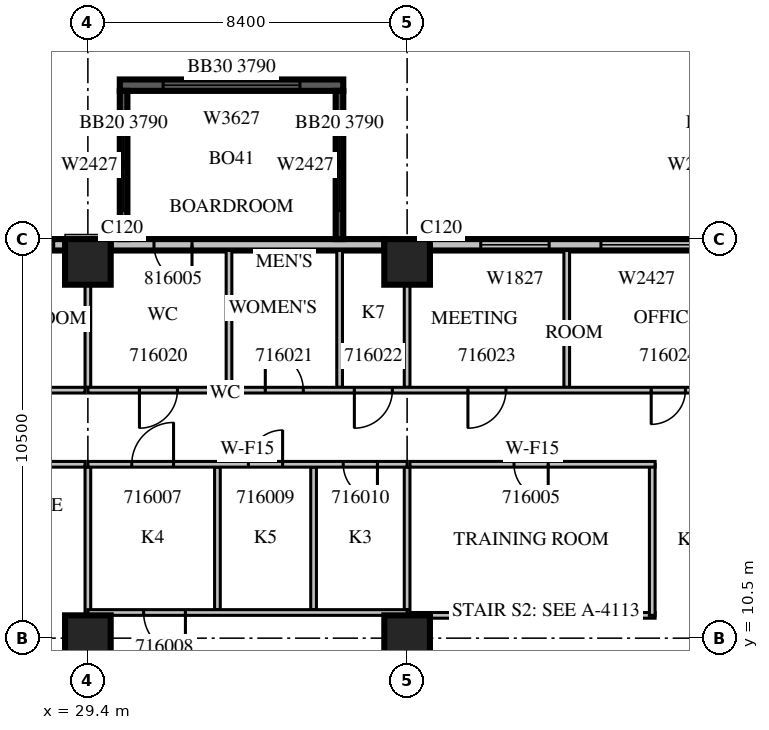
"""IFC4 building model, lengths in metres.
Left out: names, types, materials, properties, quantities, classifications, styles, units other than length and angle.
Written with IfcOpenShell. Run it as: python <this file> out.ifc"""

import sys

from ifc_helpers import new_model, si_unit, direction, frame, frame_2d, origin, origin_2d, place, context, subcontext, project, spatial, rectangle, extrude, source, transform, mapped, element, fill, save


model = new_model("IFC4")
c1 = context("Model", 3, precision=1e-05, world=origin(), true_north=direction((0.0, 1.0)))
c2 = subcontext(c1, "Body", "Model", "MODEL_VIEW")
j1 = project(units=[si_unit("LENGTHUNIT", "METRE"), si_unit("PLANEANGLEUNIT", "RADIAN")], contexts=[c1])
p1 = place(None, origin())
s1 = spatial("IfcSite", under=j1, at=p1, CompositionType="ELEMENT")
p2 = place(p1, origin())
s2 = spatial("IfcBuilding", under=s1, at=p2, CompositionType="ELEMENT")
p3 = place(p2, frame((0.0, 0.0, 78.3)))
s3 = spatial("IfcBuildingStorey", under=s2, at=p3, CompositionType="ELEMENT", Elevation=78.3)
m1 = source(origin(), c2, "Body", "SweptSolid", [
    extrude(rectangle(XDim=1.2, YDim=1.2, at=origin_2d()), origin(), (0.0, 0.0, 1.0), 4.2),
])
for number, where, z_axis, x_axis in (
    (1, (29.4, 10.5, 0.0), (0.0, 0.0, 1.0), (1.0, 0.0, 0.0)),
    (2, (37.8, 10.5, 0.0), (0.0, 0.0, 1.0), (1.0, 0.0, 0.0)),
    (3, (29.4, 20.4, 0.0), (0.0, 0.0, 1.0), (1.0, 0.0, 0.0)),
    (4, (37.8, 20.4, 0.0), (0.0, 0.0, 1.0), (1.0, 0.0, 0.0)),
):
    element("IfcColumn", number, at=place(p3, frame(where, z_axis=z_axis, x_axis=x_axis)), inside=s3, PredefinedType="COLUMN", context=c2, shape_type="MappedRepresentation", body=[
        mapped(m1, transform((0.0, 0.0, 0.0), scale=1.0)),
    ])
m2 = source(origin(), c2, "Body", "SweptSolid", [
    extrude(rectangle(XDim=7.2, YDim=0.3, at=frame_2d((3.6, 0.0))), origin(), (0.0, 0.0, 1.0), 3.8),
])
p4 = place(p3, frame((45.6, 20.85, 0.0), z_axis=(0.0, 0.0, 1.0), x_axis=(-1.0, 0.0, 0.0)))
e5 = element("IfcWall", 5, at=p4, inside=s3, PredefinedType="STANDARD", context=c2, shape_type="MappedRepresentation", body=[
    mapped(m2, transform((0.0, 0.0, 0.0), scale=1.0)),
])
m3 = source(origin(), c2, "Body", "SweptSolid", [
    extrude(rectangle(XDim=2.4, YDim=2.7, at=frame_2d((1.2, 1.35))), frame((0.0, 0.16, 0.0), z_axis=(0.0, -1.0, 0.0), x_axis=(1.0, 0.0, 0.0)), (0.0, 0.0, 1.0), 0.32),
])
p5 = place(p4, frame((0.3, 0.0, 0.6)))
e6 = element("IfcOpeningElement", 6, at=p5, cuts=e5, PredefinedType="OPENING", context=c2, shape_type="MappedRepresentation", body=[
    mapped(m3, transform((0.0, 0.0, 0.0), scale=1.0)),
])
m4 = source(origin(), c2, "Body", "SweptSolid", [
    extrude(rectangle(XDim=1.8, YDim=2.7, at=frame_2d((0.9, 1.35))), frame((0.0, 0.16, 0.0), z_axis=(0.0, -1.0, 0.0), x_axis=(1.0, 0.0, 0.0)), (0.0, 0.0, 1.0), 0.32),
])
p6 = place(p4, frame((4.062, 0.0, 0.6)))
e7 = element("IfcOpeningElement", 7, at=p6, cuts=e5, PredefinedType="OPENING", context=c2, shape_type="MappedRepresentation", body=[
    mapped(m4, transform((0.0, 0.0, 0.0), scale=1.0)),
])
p7 = place(p3, frame((37.2, 20.85, 0.0), z_axis=(0.0, 0.0, 1.0), x_axis=(-1.0, 0.0, 0.0)))
e8 = element("IfcWall", 8, at=p7, inside=s3, PredefinedType="STANDARD", context=c2, shape_type="MappedRepresentation", body=[
    mapped(m2, transform((0.0, 0.0, 0.0), scale=1.0)),
])
m5 = source(origin(), c2, "Body", "SweptSolid", [
    extrude(rectangle(XDim=1.0, YDim=2.1, at=frame_2d((0.5, 1.05))), frame((0.0, 0.16, 0.0), z_axis=(0.0, -1.0, 0.0), x_axis=(1.0, 0.0, 0.0)), (0.0, 0.0, 1.0), 0.32),
])
p8 = place(p7, frame((5.06, 0.0, 0.0)))
e9 = element("IfcOpeningElement", 9, at=p8, cuts=e8, PredefinedType="OPENING", context=c2, shape_type="MappedRepresentation", body=[
    mapped(m5, transform((0.0, 0.0, 0.0), scale=1.0)),
])
m6 = source(origin(), c2, "Body", "SweptSolid", [
    extrude(rectangle(XDim=6.6, YDim=0.3, at=frame_2d((3.3, 0.0))), origin(), (0.0, 0.0, 1.0), 3.8),
])
p9 = place(p3, frame((28.8, 20.85, 0.0), z_axis=(0.0, 0.0, 1.0), x_axis=(-1.0, 0.0, 0.0)))
e10 = element("IfcWall", 10, at=p9, inside=s3, PredefinedType="STANDARD", context=c2, shape_type="MappedRepresentation", body=[
    mapped(m6, transform((0.0, 0.0, 0.0), scale=1.0)),
])
p10 = place(p9, frame((0.3, 0.0, 0.6)))
e11 = element("IfcOpeningElement", 11, at=p10, cuts=e10, PredefinedType="OPENING", context=c2, shape_type="MappedRepresentation", body=[
    mapped(m3, transform((0.0, 0.0, 0.0), scale=1.0)),
])
m7 = source(origin(), c2, "Body", "SweptSolid", [
    extrude(rectangle(XDim=1.2, YDim=2.7, at=frame_2d((0.6, 1.35))), frame((0.0, 0.16, 0.0), z_axis=(0.0, -1.0, 0.0), x_axis=(1.0, 0.0, 0.0)), (0.0, 0.0, 1.0), 0.32),
])
p11 = place(p9, frame((4.412, 0.0, 0.6)))
e12 = element("IfcOpeningElement", 12, at=p11, cuts=e10, PredefinedType="OPENING", context=c2, shape_type="MappedRepresentation", body=[
    mapped(m7, transform((0.0, 0.0, 0.0), scale=1.0)),
])
m8 = source(origin(), c2, "Body", "SweptSolid", [
    extrude(rectangle(XDim=5.88, YDim=0.3, at=frame_2d((2.94, 0.0))), origin(), (0.0, 0.0, 1.0), 3.79),
])
p12 = place(p3, frame((36.12, 25.05, 0.0), z_axis=(0.0, 0.0, 1.0), x_axis=(-1.0, 0.0, 0.0)))
e13 = element("IfcWall", 13, at=p12, inside=s3, PredefinedType="SOLIDWALL", context=c2, shape_type="MappedRepresentation", body=[
    mapped(m8, transform((0.0, 0.0, 0.0), scale=1.0)),
])
m9 = source(origin(), c2, "Body", "SweptSolid", [
    extrude(rectangle(XDim=3.6, YDim=2.7, at=frame_2d((1.8, 1.35))), frame((0.0, 0.16, 0.0), z_axis=(0.0, -1.0, 0.0), x_axis=(1.0, 0.0, 0.0)), (0.0, 0.0, 1.0), 0.32),
])
p13 = place(p12, frame((1.14, 0.0, 0.6)))
e14 = element("IfcOpeningElement", 14, at=p13, cuts=e13, PredefinedType="OPENING", context=c2, shape_type="MappedRepresentation", body=[
    mapped(m9, transform((0.0, 0.0, 0.0), scale=1.0)),
])
m10 = source(origin(), c2, "Body", "SweptSolid", [
    extrude(rectangle(XDim=3.9, YDim=0.2, at=frame_2d((1.95, 0.0))), origin(), (0.0, 0.0, 1.0), 3.79),
])
p14 = place(p3, frame((36.02, 21.0, 0.0), z_axis=(0.0, 0.0, 1.0), x_axis=(0.0, 1.0, 0.0)))
e15 = element("IfcWall", 15, at=p14, inside=s3, PredefinedType="SOLIDWALL", context=c2, shape_type="MappedRepresentation", body=[
    mapped(m10, transform((0.0, 0.0, 0.0), scale=1.0)),
])
m11 = source(origin(), c2, "Body", "SweptSolid", [
    extrude(rectangle(XDim=2.4, YDim=2.7, at=frame_2d((1.2, 1.35))), frame((0.0, 0.11, 0.0), z_axis=(0.0, -1.0, 0.0), x_axis=(1.0, 0.0, 0.0)), (0.0, 0.0, 1.0), 0.22),
])
p15 = place(p14, frame((0.75, 0.0, 0.6)))
e16 = element("IfcOpeningElement", 16, at=p15, cuts=e15, PredefinedType="OPENING", context=c2, shape_type="MappedRepresentation", body=[
    mapped(m11, transform((0.0, 0.0, 0.0), scale=1.0)),
])
p16 = place(p3, frame((30.34, 21.0, 0.0), z_axis=(0.0, 0.0, 1.0), x_axis=(0.0, 1.0, 0.0)))
e17 = element("IfcWall", 17, at=p16, inside=s3, PredefinedType="SOLIDWALL", context=c2, shape_type="MappedRepresentation", body=[
    mapped(m10, transform((0.0, 0.0, 0.0), scale=1.0)),
])
p17 = place(p16, frame((0.75, 0.0, 0.6)))
e18 = element("IfcOpeningElement", 18, at=p17, cuts=e17, PredefinedType="OPENING", context=c2, shape_type="MappedRepresentation", body=[
    mapped(m11, transform((0.0, 0.0, 0.0), scale=1.0)),
])
m12 = source(origin(), c2, "Body", "SweptSolid", [
    extrude(rectangle(XDim=4.45, YDim=0.15, at=frame_2d((2.225, 0.0))), origin(), (0.0, 0.0, 1.0), 3.8),
])
for number, where, z_axis, x_axis in (
    (19, (29.325, 15.075, 0.0), (0.0, 0.0, 1.0), (-1.0, 0.0, 0.0)),
    (20, (24.875, 17.025, 0.0), (0.0, 0.0, 1.0), (1.0, 0.0, 0.0)),
):
    element("IfcWall", number, at=place(p3, frame(where, z_axis=z_axis, x_axis=x_axis)), inside=s3, PredefinedType="PARTITIONING", context=c2, shape_type="MappedRepresentation", body=[
        mapped(m12, transform((0.0, 0.0, 0.0), scale=1.0)),
    ])
m13 = source(origin(), c2, "Body", "SweptSolid", [
    extrude(rectangle(XDim=3.901, YDim=0.15, at=frame_2d((1.95, 0.0))), origin(), (0.0, 0.0, 1.0), 3.8),
])
p18 = place(p3, frame((29.4, 11.099, 0.0), z_axis=(0.0, 0.0, 1.0), x_axis=(0.0, 1.0, 0.0)))
e21 = element("IfcWall", 21, at=p18, inside=s3, PredefinedType="PARTITIONING", context=c2, shape_type="MappedRepresentation", body=[
    mapped(m13, transform((0.0, 0.0, 0.0), scale=1.0)),
])
m14 = source(origin(), c2, "Body", "SweptSolid", [
    extrude(rectangle(XDim=2.701, YDim=0.15, at=frame_2d((1.351, 0.0))), origin(), (0.0, 0.0, 1.0), 3.8),
])
p19 = place(p3, frame((29.4, 17.1, 0.0), z_axis=(0.0, 0.0, 1.0), x_axis=(0.0, 1.0, 0.0)))
e22 = element("IfcWall", 22, at=p19, inside=s3, PredefinedType="PARTITIONING", context=c2, shape_type="MappedRepresentation", body=[
    mapped(m14, transform((0.0, 0.0, 0.0), scale=1.0)),
])
m15 = source(origin(), c2, "Body", "SweptSolid", [
    extrude(rectangle(XDim=6.45, YDim=0.15, at=frame_2d((3.225, 0.0))), origin(), (0.0, 0.0, 1.0), 3.8),
])
p20 = place(p3, frame((37.875, 11.1, 0.0), z_axis=(0.0, 0.0, 1.0), x_axis=(1.0, 0.0, 0.0)))
e23 = element("IfcWall", 23, at=p20, inside=s3, PredefinedType="PARTITIONING", context=c2, shape_type="MappedRepresentation", body=[
    mapped(m15, transform((0.0, 0.0, 0.0), scale=1.0)),
])
m16 = source(origin(), c2, "Body", "SweptSolid", [
    extrude(rectangle(XDim=3.975, YDim=0.15, at=frame_2d((1.988, 0.0))), origin(), (0.0, 0.0, 1.0), 3.8),
])
p21 = place(p3, frame((44.25, 11.1, 0.0), z_axis=(0.0, 0.0, 1.0), x_axis=(0.0, 1.0, 0.0)))
e24 = element("IfcWall", 24, at=p21, inside=s3, PredefinedType="PARTITIONING", context=c2, shape_type="MappedRepresentation", body=[
    mapped(m16, transform((0.0, 0.0, 0.0), scale=1.0)),
])
p22 = place(p3, frame((44.325, 15.075, 0.0), z_axis=(0.0, 0.0, 1.0), x_axis=(-1.0, 0.0, 0.0)))
e25 = element("IfcWall", 25, at=p22, inside=s3, PredefinedType="PARTITIONING", context=c2, shape_type="MappedRepresentation", body=[
    mapped(m15, transform((0.0, 0.0, 0.0), scale=1.0)),
])
m17 = source(origin(), c2, "Body", "SweptSolid", [
    extrude(rectangle(XDim=0.9, YDim=2.1, at=frame_2d((0.45, 1.05))), frame((0.0, 0.085, 0.0), z_axis=(0.0, -1.0, 0.0), x_axis=(1.0, 0.0, 0.0)), (0.0, 0.0, 1.0), 0.17),
])
p23 = place(p22, frame((2.812, 0.0, 0.0)))
e26 = element("IfcOpeningElement", 26, at=p23, cuts=e25, PredefinedType="OPENING", context=c2, shape_type="MappedRepresentation", body=[
    mapped(m17, transform((0.0, 0.0, 0.0), scale=1.0)),
])
m18 = source(origin(), c2, "Body", "SweptSolid", [
    extrude(rectangle(XDim=3.75, YDim=0.15, at=frame_2d((1.875, 0.0))), origin(), (0.0, 0.0, 1.0), 3.8),
])
for number, where, z_axis, x_axis in (
    (27, (32.809, 11.25, 0.0), (0.0, 0.0, 1.0), (0.0, 1.0, 0.0)),
    (28, (35.339, 11.25, 0.0), (0.0, 0.0, 1.0), (0.0, 1.0, 0.0)),
    (29, (37.8, 11.25, 0.0), (0.0, 0.0, 1.0), (0.0, 1.0, 0.0)),
):
    element("IfcWall", number, at=place(p3, frame(where, z_axis=z_axis, x_axis=x_axis)), inside=s3, PredefinedType="PARTITIONING", context=c2, shape_type="MappedRepresentation", body=[
        mapped(m18, transform((0.0, 0.0, 0.0), scale=1.0)),
    ])
m19 = source(origin(), c2, "Body", "SweptSolid", [
    extrude(rectangle(XDim=8.4, YDim=0.15, at=frame_2d((4.2, 0.0))), origin(), (0.0, 0.0, 1.0), 3.8),
])
p24 = place(p3, frame((37.8, 11.175, 0.0), z_axis=(0.0, 0.0, 1.0), x_axis=(-1.0, 0.0, 0.0)))
e30 = element("IfcWall", 30, at=p24, inside=s3, PredefinedType="PARTITIONING", context=c2, shape_type="MappedRepresentation", body=[
    mapped(m19, transform((0.0, 0.0, 0.0), scale=1.0)),
])
m20 = source(origin(), c2, "Body", "SweptSolid", [
    extrude(rectangle(XDim=1.1, YDim=2.1, at=frame_2d((0.55, 1.05))), frame((0.0, 0.085, 0.0), z_axis=(0.0, -1.0, 0.0), x_axis=(1.0, 0.0, 0.0)), (0.0, 0.0, 1.0), 0.17),
])
p25 = place(p24, frame((5.833, 0.0, 0.0)))
e31 = element("IfcOpeningElement", 31, at=p25, cuts=e30, PredefinedType="OPENING", context=c2, shape_type="MappedRepresentation", body=[
    mapped(m20, transform((0.0, 0.0, 0.0), scale=1.0)),
])
m21 = source(origin(), c2, "Body", "SweptSolid", [
    extrude(rectangle(XDim=3.6, YDim=0.15, at=frame_2d((1.8, 0.0))), origin(), (0.0, 0.0, 1.0), 3.8),
])
for number, where, z_axis, x_axis in (
    (32, (33.113, 20.7, 0.0), (0.0, 0.0, 1.0), (0.0, -1.0, 0.0)),
    (33, (36.024, 20.7, 0.0), (0.0, 0.0, 1.0), (0.0, -1.0, 0.0)),
):
    element("IfcWall", number, at=place(p3, frame(where, z_axis=z_axis, x_axis=x_axis)), inside=s3, PredefinedType="PARTITIONING", context=c2, shape_type="MappedRepresentation", body=[
        mapped(m21, transform((0.0, 0.0, 0.0), scale=1.0)),
    ])
p26 = place(p3, frame((37.8, 17.1, 0.0), z_axis=(0.0, 0.0, 1.0), x_axis=(0.0, 1.0, 0.0)))
e34 = element("IfcWall", 34, at=p26, inside=s3, PredefinedType="PARTITIONING", context=c2, shape_type="MappedRepresentation", body=[
    mapped(m14, transform((0.0, 0.0, 0.0), scale=1.0)),
])
p27 = place(p3, frame((42.0, 17.1, 0.0), z_axis=(0.0, 0.0, 1.0), x_axis=(0.0, 1.0, 0.0)))
e35 = element("IfcWall", 35, at=p27, inside=s3, PredefinedType="PARTITIONING", context=c2, shape_type="MappedRepresentation", body=[
    mapped(m21, transform((0.0, 0.0, 0.0), scale=1.0)),
])
p28 = place(p3, frame((37.8, 15.075, 0.0), z_axis=(0.0, 0.0, 1.0), x_axis=(-1.0, 0.0, 0.0)))
e36 = element("IfcWall", 36, at=p28, inside=s3, PredefinedType="PARTITIONING", context=c2, shape_type="MappedRepresentation", body=[
    mapped(m19, transform((0.0, 0.0, 0.0), scale=1.0)),
])
p29 = place(p28, frame((6.146, 0.0, 0.0)))
e37 = element("IfcOpeningElement", 37, at=p29, cuts=e36, PredefinedType="OPENING", context=c2, shape_type="MappedRepresentation", body=[
    mapped(m20, transform((0.0, 0.0, 0.0), scale=1.0)),
])
p30 = place(p28, frame((3.276, 0.0, 0.0)))
e38 = element("IfcOpeningElement", 38, at=p30, cuts=e36, PredefinedType="OPENING", context=c2, shape_type="MappedRepresentation", body=[
    mapped(m17, transform((0.0, 0.0, 0.0), scale=1.0)),
])
p31 = place(p28, frame((0.781, 0.0, 0.0)))
e39 = element("IfcOpeningElement", 39, at=p31, cuts=e36, PredefinedType="OPENING", context=c2, shape_type="MappedRepresentation", body=[
    mapped(m17, transform((0.0, 0.0, 0.0), scale=1.0)),
])
m22 = source(origin(), c2, "Body", "SweptSolid", [
    extrude(rectangle(XDim=37.5, YDim=0.15, at=frame_2d((18.75, 0.0))), origin(), (0.0, 0.0, 1.0), 3.8),
])
p32 = place(p3, frame((29.4, 17.025, 0.0), z_axis=(0.0, 0.0, 1.0), x_axis=(1.0, 0.0, 0.0)))
e40 = element("IfcWall", 40, at=p32, inside=s3, PredefinedType="PARTITIONING", context=c2, shape_type="MappedRepresentation", body=[
    mapped(m22, transform((0.0, 0.0, 0.0), scale=1.0)),
])
m23 = source(origin(), c2, "Body", "SweptSolid", [
    extrude(rectangle(XDim=1.0, YDim=2.1, at=frame_2d((0.5, 1.05))), frame((0.0, 0.085, 0.0), z_axis=(0.0, -1.0, 0.0), x_axis=(1.0, 0.0, 0.0)), (0.0, 0.0, 1.0), 0.17),
])
p33 = place(p32, frame((1.357, 0.0, 0.0)))
e41 = element("IfcOpeningElement", 41, at=p33, cuts=e40, PredefinedType="OPENING", context=c2, shape_type="MappedRepresentation", body=[
    mapped(m23, transform((0.0, 0.0, 0.0), scale=1.0)),
])
p34 = place(p32, frame((4.669, 0.0, 0.0)))
e42 = element("IfcOpeningElement", 42, at=p34, cuts=e40, PredefinedType="OPENING", context=c2, shape_type="MappedRepresentation", body=[
    mapped(m23, transform((0.0, 0.0, 0.0), scale=1.0)),
])
p35 = place(p32, frame((7.012, 0.0, 0.0)))
e43 = element("IfcOpeningElement", 43, at=p35, cuts=e40, PredefinedType="OPENING", context=c2, shape_type="MappedRepresentation", body=[
    mapped(m23, transform((0.0, 0.0, 0.0), scale=1.0)),
])
p36 = place(p32, frame((10.0, 0.0, 0.0)))
e44 = element("IfcOpeningElement", 44, at=p36, cuts=e40, PredefinedType="OPENING", context=c2, shape_type="MappedRepresentation", body=[
    mapped(m23, transform((0.0, 0.0, 0.0), scale=1.0)),
])
p37 = place(p32, frame((14.822, 0.0, 0.0)))
e45 = element("IfcOpeningElement", 45, at=p37, cuts=e40, PredefinedType="OPENING", context=c2, shape_type="MappedRepresentation", body=[
    mapped(m17, transform((0.0, 0.0, 0.0), scale=1.0)),
])
p38 = place(p32, frame((20.13, 0.0, 0.0)))
e46 = element("IfcOpeningElement", 46, at=p38, cuts=e40, PredefinedType="OPENING", context=c2, shape_type="MappedRepresentation", body=[
    mapped(m17, transform((0.0, 0.0, 0.0), scale=1.0)),
])
p39 = place(p32, frame((25.438, 0.0, 0.0)))
e47 = element("IfcOpeningElement", 47, at=p39, cuts=e40, PredefinedType="OPENING", context=c2, shape_type="MappedRepresentation", body=[
    mapped(m17, transform((0.0, 0.0, 0.0), scale=1.0)),
])
p40 = place(p32, frame((30.364, 0.0, 0.0)))
e48 = element("IfcOpeningElement", 48, at=p40, cuts=e40, PredefinedType="OPENING", context=c2, shape_type="MappedRepresentation", body=[
    mapped(m17, transform((0.0, 0.0, 0.0), scale=1.0)),
])
p41 = place(p32, frame((34.871, 0.0, 0.0)))
e49 = element("IfcOpeningElement", 49, at=p41, cuts=e40, PredefinedType="OPENING", context=c2, shape_type="MappedRepresentation", body=[
    mapped(m17, transform((0.0, 0.0, 0.0), scale=1.0)),
])
m24 = source(origin(), c2, "Body", "SweptSolid", [
    extrude(rectangle(XDim=2.4, YDim=2.7, at=frame_2d((1.2, 1.35))), frame((0.0, 0.03, 0.0), z_axis=(0.0, -1.0, 0.0), x_axis=(1.0, 0.0, 0.0)), (0.0, 0.0, 1.0), 0.06),
])
p42 = place(p5, origin())
e50 = element("IfcWindow", 50, at=p42, inside=s3, PartitioningType="SINGLE_PANEL", PredefinedType="WINDOW", context=c2, shape_type="MappedRepresentation", body=[
    mapped(m24, transform((0.0, 0.0, 0.0), scale=1.0)),
])
fill(e6, e50)
p43 = place(p10, origin())
e51 = element("IfcWindow", 51, at=p43, inside=s3, PartitioningType="SINGLE_PANEL", PredefinedType="WINDOW", context=c2, shape_type="MappedRepresentation", body=[
    mapped(m24, transform((0.0, 0.0, 0.0), scale=1.0)),
])
fill(e11, e51)
m25 = source(origin(), c2, "Body", "SweptSolid", [
    extrude(rectangle(XDim=1.8, YDim=2.7, at=frame_2d((0.9, 1.35))), frame((0.0, 0.03, 0.0), z_axis=(0.0, -1.0, 0.0), x_axis=(1.0, 0.0, 0.0)), (0.0, 0.0, 1.0), 0.06),
])
p44 = place(p6, origin())
e52 = element("IfcWindow", 52, at=p44, inside=s3, PartitioningType="SINGLE_PANEL", PredefinedType="WINDOW", context=c2, shape_type="MappedRepresentation", body=[
    mapped(m25, transform((0.0, 0.0, 0.0), scale=1.0)),
])
fill(e7, e52)
m26 = source(origin(), c2, "Body", "SweptSolid", [
    extrude(rectangle(XDim=3.6, YDim=2.7, at=frame_2d((1.8, 1.35))), frame((0.0, 0.03, 0.0), z_axis=(0.0, -1.0, 0.0), x_axis=(1.0, 0.0, 0.0)), (0.0, 0.0, 1.0), 0.06),
])
p45 = place(p13, origin())
e53 = element("IfcWindow", 53, at=p45, inside=s3, PartitioningType="SINGLE_PANEL", PredefinedType="WINDOW", context=c2, shape_type="MappedRepresentation", body=[
    mapped(m26, transform((0.0, 0.0, 0.0), scale=1.0)),
])
fill(e14, e53)
p46 = place(p15, origin())
e54 = element("IfcWindow", 54, at=p46, inside=s3, PartitioningType="SINGLE_PANEL", PredefinedType="WINDOW", context=c2, shape_type="MappedRepresentation", body=[
    mapped(m24, transform((0.0, 0.0, 0.0), scale=1.0)),
])
fill(e16, e54)
p47 = place(p17, origin())
e55 = element("IfcWindow", 55, at=p47, inside=s3, PartitioningType="SINGLE_PANEL", PredefinedType="WINDOW", context=c2, shape_type="MappedRepresentation", body=[
    mapped(m24, transform((0.0, 0.0, 0.0), scale=1.0)),
])
fill(e18, e55)
m27 = source(origin(), c2, "Body", "SweptSolid", [
    extrude(rectangle(XDim=0.9, YDim=2.1, at=frame_2d((0.45, 1.05))), frame((0.0, 0.025, 0.0), z_axis=(0.0, -1.0, 0.0), x_axis=(1.0, 0.0, 0.0)), (0.0, 0.0, 1.0), 0.05),
])
p48 = place(p23, origin())
e56 = element("IfcDoor", 56, at=p48, inside=s3, OperationType="SINGLE_SWING_LEFT", PredefinedType="DOOR", context=c2, shape_type="MappedRepresentation", body=[
    mapped(m27, transform((0.0, 0.0, 0.0), scale=1.0)),
])
fill(e26, e56)
m28 = source(origin(), c2, "Body", "SweptSolid", [
    extrude(rectangle(XDim=1.1, YDim=2.1, at=frame_2d((0.55, 1.05))), frame((0.0, 0.025, 0.0), z_axis=(0.0, -1.0, 0.0), x_axis=(1.0, 0.0, 0.0)), (0.0, 0.0, 1.0), 0.05),
])
p49 = place(p29, origin())
e57 = element("IfcDoor", 57, at=p49, inside=s3, OperationType="SINGLE_SWING_RIGHT", PredefinedType="DOOR", context=c2, shape_type="MappedRepresentation", body=[
    mapped(m28, transform((0.0, 0.0, 0.0), scale=1.0)),
])
fill(e37, e57)
p50 = place(p25, origin())
e58 = element("IfcDoor", 58, at=p50, inside=s3, OperationType="SINGLE_SWING_LEFT", PredefinedType="DOOR", context=c2, shape_type="MappedRepresentation", body=[
    mapped(m28, transform((0.0, 0.0, 0.0), scale=1.0)),
])
fill(e31, e58)
p51 = place(p30, origin())
e59 = element("IfcDoor", 59, at=p51, inside=s3, OperationType="SINGLE_SWING_RIGHT", PredefinedType="DOOR", context=c2, shape_type="MappedRepresentation", body=[
    mapped(m27, transform((0.0, 0.0, 0.0), scale=1.0)),
])
fill(e38, e59)
p52 = place(p31, origin())
e60 = element("IfcDoor", 60, at=p52, inside=s3, OperationType="SINGLE_SWING_LEFT", PredefinedType="DOOR", context=c2, shape_type="MappedRepresentation", body=[
    mapped(m27, transform((0.0, 0.0, 0.0), scale=1.0)),
])
fill(e39, e60)
m29 = source(origin(), c2, "Body", "SweptSolid", [
    extrude(rectangle(XDim=1.0, YDim=2.1, at=frame_2d((0.5, 1.05))), frame((0.0, 0.025, 0.0), z_axis=(0.0, -1.0, 0.0), x_axis=(1.0, 0.0, 0.0)), (0.0, 0.0, 1.0), 0.05),
])
p53 = place(p33, origin())
e61 = element("IfcDoor", 61, at=p53, inside=s3, OperationType="SINGLE_SWING_RIGHT", PredefinedType="DOOR", context=c2, shape_type="MappedRepresentation", body=[
    mapped(m29, transform((0.0, 0.0, 0.0), scale=1.0)),
])
fill(e41, e61)
p54 = place(p34, origin())
e62 = element("IfcDoor", 62, at=p54, inside=s3, OperationType="SINGLE_SWING_LEFT", PredefinedType="DOOR", context=c2, shape_type="MappedRepresentation", body=[
    mapped(m29, transform((0.0, 0.0, 0.0), scale=1.0)),
])
fill(e42, e62)
p55 = place(p35, origin())
e63 = element("IfcDoor", 63, at=p55, inside=s3, OperationType="SINGLE_SWING_RIGHT", PredefinedType="DOOR", context=c2, shape_type="MappedRepresentation", body=[
    mapped(m29, transform((0.0, 0.0, 0.0), scale=1.0)),
])
fill(e43, e63)
p56 = place(p36, origin())
e64 = element("IfcDoor", 64, at=p56, inside=s3, OperationType="SINGLE_SWING_RIGHT", PredefinedType="DOOR", context=c2, shape_type="MappedRepresentation", body=[
    mapped(m29, transform((0.0, 0.0, 0.0), scale=1.0)),
])
fill(e44, e64)
p57 = place(p37, origin())
e65 = element("IfcDoor", 65, at=p57, inside=s3, OperationType="SINGLE_SWING_RIGHT", PredefinedType="DOOR", context=c2, shape_type="MappedRepresentation", body=[
    mapped(m27, transform((0.0, 0.0, 0.0), scale=1.0)),
])
fill(e45, e65)
p58 = place(p8, origin())
e66 = element("IfcDoor", 66, at=p58, inside=s3, OperationType="SINGLE_SWING_LEFT", PredefinedType="DOOR", context=c2, shape_type="MappedRepresentation", body=[
    mapped(m29, transform((0.0, 0.0, 0.0), scale=1.0)),
])
fill(e9, e66)
save(model, sys.argv[1])
